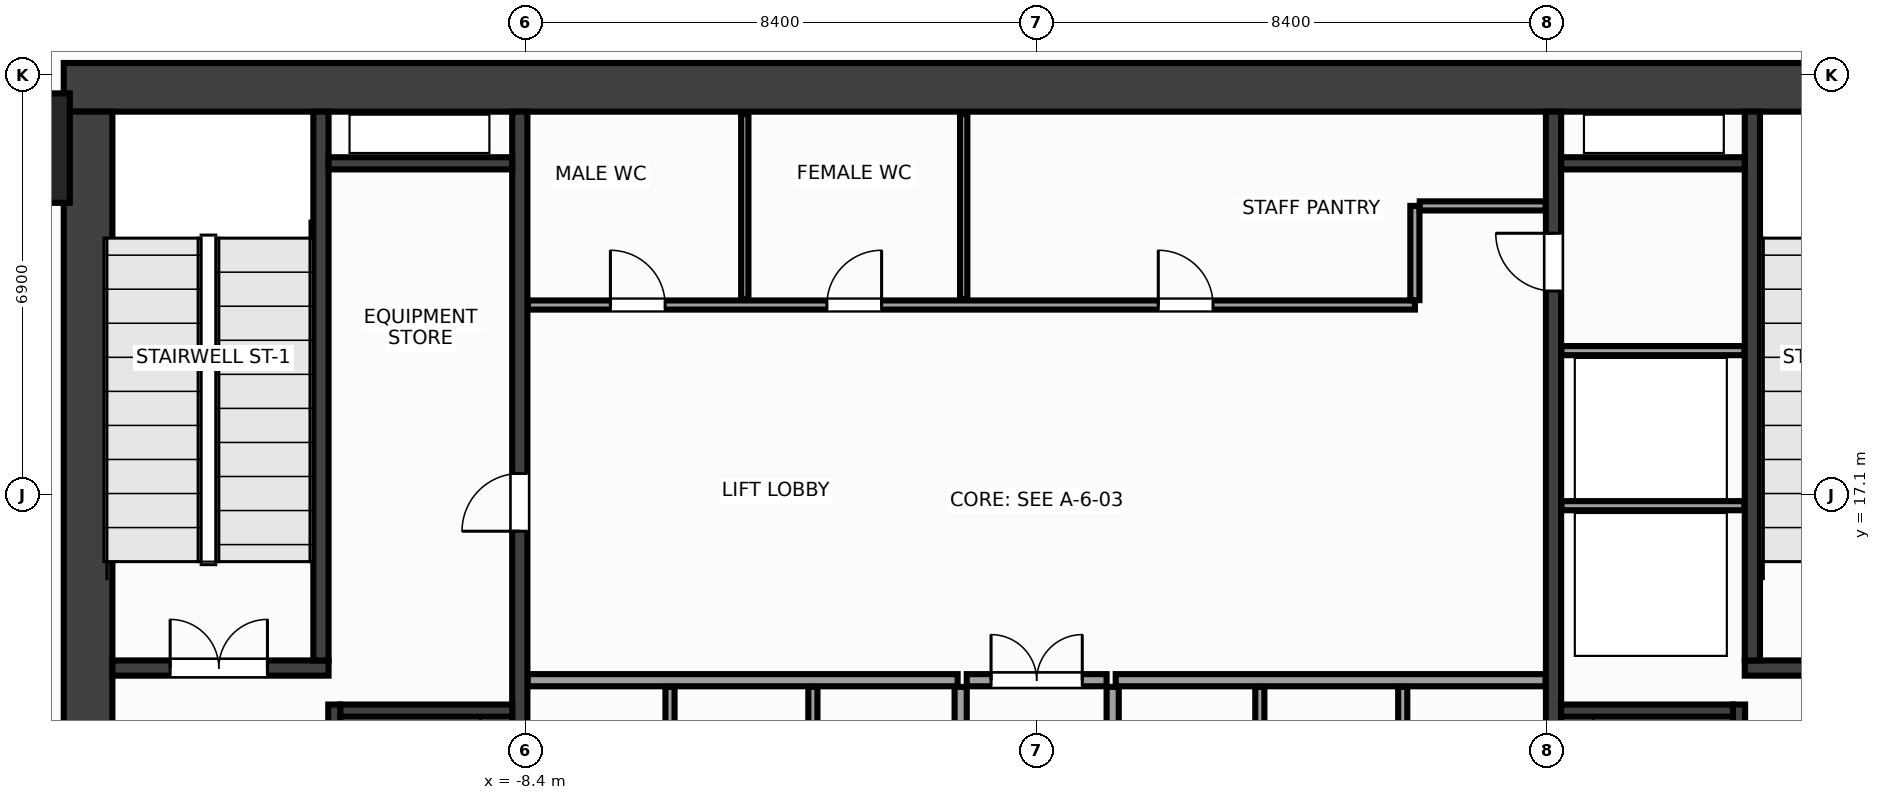
"""IFC4 building model, lengths in metres.
Left out: names, types, materials, properties, quantities, classifications, styles, units other than length and angle.
Written with IfcOpenShell. Run it as: python <this file> out.ifc"""

import sys

from ifc_helpers import new_model, si_unit, direction, frame, frame_2d, origin, origin_2d, place, context, subcontext, project, spatial, rectangle, extrude, source, transform, mapped, element, fill, save


model = new_model("IFC4")
c1 = context("Model", 3, precision=1e-05, world=origin(), true_north=direction((0.0, 1.0)))
c2 = subcontext(c1, "Body", "Model", "MODEL_VIEW")
j1 = project(units=[si_unit("LENGTHUNIT", "METRE"), si_unit("PLANEANGLEUNIT", "RADIAN")], contexts=[c1])
p1 = place(None, origin())
s1 = spatial("IfcSite", under=j1, at=p1, CompositionType="ELEMENT")
p2 = place(p1, origin())
s2 = spatial("IfcBuilding", under=s1, at=p2, CompositionType="ELEMENT")
p3 = place(p2, frame((0.0, 0.0, 70.4)))
s3 = spatial("IfcBuildingStorey", under=s2, at=p3, CompositionType="ELEMENT", Elevation=70.4)
m1 = source(origin(), c2, "Body", "SweptSolid", [
    extrude(rectangle(XDim=32.0, YDim=0.8, at=frame_2d((16.0, 0.0))), origin(), (0.0, 0.0, 1.0), 7.2),
])
p4 = place(p3, frame((-16.0, 23.8, 0.0), z_axis=(0.0, 0.0, 1.0), x_axis=(1.0, 0.0, 0.0)))
e1 = element("IfcWall", 1, at=p4, inside=s3, PredefinedType="SHEAR", context=c2, shape_type="MappedRepresentation", body=[
    mapped(m1, transform((0.0, 0.0, 0.0), x_axis=(1.0, 0.0, 0.0), y_axis=(0.0, 1.0, 0.0), z_axis=(0.0, 0.0, 1.0), scale=1.0)),
])
m2 = source(origin(), c2, "Body", "SweptSolid", [
    extrude(rectangle(XDim=12.8, YDim=0.8, at=frame_2d((6.4, 0.0))), origin(), (0.0, 0.0, 1.0), 7.2),
])
p5 = place(p3, frame((-15.6, 10.6, 0.0), z_axis=(0.0, 0.0, 1.0), x_axis=(0.0, 1.0, 0.0)))
e2 = element("IfcWall", 2, at=p5, inside=s3, PredefinedType="SHEAR", context=c2, shape_type="MappedRepresentation", body=[
    mapped(m2, transform((0.0, 0.0, 0.0), x_axis=(1.0, 0.0, 0.0), y_axis=(0.0, 1.0, 0.0), z_axis=(0.0, 0.0, 1.0), scale=1.0)),
])
m3 = source(origin(), c2, "Body", "SweptSolid", [
    extrude(rectangle(XDim=12.8, YDim=0.25, at=frame_2d((6.4, 0.0))), origin(), (0.0, 0.0, 1.0), 7.2),
])
p6 = place(p3, frame((-8.5, 10.6, 0.0), z_axis=(0.0, 0.0, 1.0), x_axis=(0.0, 1.0, 0.0)))
e3 = element("IfcWall", 3, at=p6, inside=s3, PredefinedType="SHEAR", context=c2, shape_type="MappedRepresentation", body=[
    mapped(m3, transform((0.0, 0.0, 0.0), x_axis=(1.0, 0.0, 0.0), y_axis=(0.0, 1.0, 0.0), z_axis=(0.0, 0.0, 1.0), scale=1.0)),
])
p7 = place(p6, frame((5.9, 0.0, 0.0)))
e4 = element("IfcOpeningElement", 4, at=p7, cuts=e3, PredefinedType="OPENING", context=c2, shape_type="SweptSolid", body=[
    extrude(rectangle(XDim=0.95, YDim=2.15, at=frame_2d((0.475, 1.075))), frame((0.0, 0.137, 0.0), z_axis=(0.0, -1.0, 0.0), x_axis=(1.0, 0.0, 0.0)), (0.0, 0.0, 1.0), 0.274),
])
p8 = place(p3, frame((8.5, 10.6, 0.0), z_axis=(0.0, 0.0, 1.0), x_axis=(0.0, 1.0, 0.0)))
e5 = element("IfcWall", 5, at=p8, inside=s3, PredefinedType="SHEAR", context=c2, shape_type="MappedRepresentation", body=[
    mapped(m3, transform((0.0, 0.0, 0.0), x_axis=(1.0, 0.0, 0.0), y_axis=(0.0, 1.0, 0.0), z_axis=(0.0, 0.0, 1.0), scale=1.0)),
])
p9 = place(p8, frame((9.85, 0.0, 0.0)))
e6 = element("IfcOpeningElement", 6, at=p9, cuts=e5, PredefinedType="OPENING", context=c2, shape_type="SweptSolid", body=[
    extrude(rectangle(XDim=0.95, YDim=2.15, at=frame_2d((0.475, 1.075))), frame((0.0, 0.137, 0.0), z_axis=(0.0, -1.0, 0.0), x_axis=(1.0, 0.0, 0.0)), (0.0, 0.0, 1.0), 0.274),
])
m4 = source(origin(), c2, "Body", "SweptSolid", [
    extrude(rectangle(XDim=3.555, YDim=0.25, at=frame_2d((1.777, 0.0))), origin(), (0.0, 0.0, 1.0), 7.2),
])
p10 = place(p3, frame((-15.2, 14.25, 0.0), z_axis=(0.0, 0.0, 1.0), x_axis=(1.0, 0.0, 0.0)))
e7 = element("IfcWall", 7, at=p10, inside=s3, PredefinedType="SHEAR", context=c2, shape_type="MappedRepresentation", body=[
    mapped(m4, transform((0.0, 0.0, 0.0), x_axis=(1.0, 0.0, 0.0), y_axis=(0.0, 1.0, 0.0), z_axis=(0.0, 0.0, 1.0), scale=1.0)),
])
p11 = place(p10, frame((0.95, 0.0, 0.0)))
e8 = element("IfcOpeningElement", 8, at=p11, cuts=e7, PredefinedType="OPENING", context=c2, shape_type="SweptSolid", body=[
    extrude(rectangle(XDim=1.6, YDim=2.15, at=frame_2d((0.8, 1.075))), frame((0.0, 0.137, 0.0), z_axis=(0.0, -1.0, 0.0), x_axis=(1.0, 0.0, 0.0)), (0.0, 0.0, 1.0), 0.274),
])
m5 = source(origin(), c2, "Body", "SweptSolid", [
    extrude(rectangle(XDim=9.025, YDim=0.25, at=frame_2d((4.512, 0.0))), origin(), (0.0, 0.0, 1.0), 7.2),
])
p12 = place(p3, frame((-11.77, 14.375, 0.0), z_axis=(0.0, 0.0, 1.0), x_axis=(0.0, 1.0, 0.0)))
e9 = element("IfcWall", 9, at=p12, inside=s3, PredefinedType="SHEAR", context=c2, shape_type="MappedRepresentation", body=[
    mapped(m5, transform((0.0, 0.0, 0.0), x_axis=(1.0, 0.0, 0.0), y_axis=(0.0, 1.0, 0.0), z_axis=(0.0, 0.0, 1.0), scale=1.0)),
])
p13 = place(p3, frame((11.645, 14.25, 0.0), z_axis=(0.0, 0.0, 1.0), x_axis=(1.0, 0.0, 0.0)))
e10 = element("IfcWall", 10, at=p13, inside=s3, PredefinedType="SHEAR", context=c2, shape_type="MappedRepresentation", body=[
    mapped(m4, transform((0.0, 0.0, 0.0), x_axis=(1.0, 0.0, 0.0), y_axis=(0.0, 1.0, 0.0), z_axis=(0.0, 0.0, 1.0), scale=1.0)),
])
p14 = place(p13, frame((0.95, 0.0, 0.0)))
e11 = element("IfcOpeningElement", 11, at=p14, cuts=e10, PredefinedType="OPENING", context=c2, shape_type="SweptSolid", body=[
    extrude(rectangle(XDim=1.6, YDim=2.15, at=frame_2d((0.8, 1.075))), frame((0.0, 0.137, 0.0), z_axis=(0.0, -1.0, 0.0), x_axis=(1.0, 0.0, 0.0)), (0.0, 0.0, 1.0), 0.274),
])
p15 = place(p3, frame((11.77, 14.375, 0.0), z_axis=(0.0, 0.0, 1.0), x_axis=(0.0, 1.0, 0.0)))
e12 = element("IfcWall", 12, at=p15, inside=s3, PredefinedType="SHEAR", context=c2, shape_type="MappedRepresentation", body=[
    mapped(m5, transform((0.0, 0.0, 0.0), x_axis=(1.0, 0.0, 0.0), y_axis=(0.0, 1.0, 0.0), z_axis=(0.0, 0.0, 1.0), scale=1.0)),
])
m6 = source(origin(), c2, "Body", "SweptSolid", [
    extrude(rectangle(XDim=3.05, YDim=0.2, at=frame_2d((1.525, 0.0))), origin(), (0.0, 0.0, 1.0), 7.2),
])
p16 = place(p3, frame((-11.55, 10.6, 0.0), z_axis=(0.0, 0.0, 1.0), x_axis=(0.0, 1.0, 0.0)))
e13 = element("IfcWall", 13, at=p16, inside=s3, PredefinedType="SHEAR", context=c2, shape_type="MappedRepresentation", body=[
    mapped(m6, transform((0.0, 0.0, 0.0), x_axis=(1.0, 0.0, 0.0), y_axis=(0.0, 1.0, 0.0), z_axis=(0.0, 0.0, 1.0), scale=1.0)),
])
p17 = place(p16, frame((0.9, 0.0, 0.0)))
e14 = element("IfcOpeningElement", 14, at=p17, cuts=e13, PredefinedType="OPENING", context=c2, shape_type="SweptSolid", body=[
    extrude(rectangle(XDim=1.1, YDim=2.15, at=frame_2d((0.55, 1.075))), frame((0.0, 0.112, 0.0), z_axis=(0.0, -1.0, 0.0), x_axis=(1.0, 0.0, 0.0)), (0.0, 0.0, 1.0), 0.224),
])
m7 = source(origin(), c2, "Body", "SweptSolid", [
    extrude(rectangle(XDim=2.825, YDim=0.2, at=frame_2d((1.413, 0.0))), origin(), (0.0, 0.0, 1.0), 7.2),
])
p18 = place(p3, frame((-11.45, 13.55, 0.0), z_axis=(0.0, 0.0, 1.0), x_axis=(1.0, 0.0, 0.0)))
e15 = element("IfcWall", 15, at=p18, inside=s3, PredefinedType="SHEAR", context=c2, shape_type="MappedRepresentation", body=[
    mapped(m7, transform((0.0, 0.0, 0.0), x_axis=(1.0, 0.0, 0.0), y_axis=(0.0, 1.0, 0.0), z_axis=(0.0, 0.0, 1.0), scale=1.0)),
])
p19 = place(p3, frame((11.55, 10.6, 0.0), z_axis=(0.0, 0.0, 1.0), x_axis=(0.0, 1.0, 0.0)))
e16 = element("IfcWall", 16, at=p19, inside=s3, PredefinedType="SHEAR", context=c2, shape_type="MappedRepresentation", body=[
    mapped(m6, transform((0.0, 0.0, 0.0), x_axis=(1.0, 0.0, 0.0), y_axis=(0.0, 1.0, 0.0), z_axis=(0.0, 0.0, 1.0), scale=1.0)),
])
p20 = place(p19, frame((0.9, 0.0, 0.0)))
e17 = element("IfcOpeningElement", 17, at=p20, cuts=e16, PredefinedType="OPENING", context=c2, shape_type="SweptSolid", body=[
    extrude(rectangle(XDim=1.1, YDim=2.15, at=frame_2d((0.55, 1.075))), frame((0.0, 0.112, 0.0), z_axis=(0.0, -1.0, 0.0), x_axis=(1.0, 0.0, 0.0)), (0.0, 0.0, 1.0), 0.224),
])
p21 = place(p3, frame((8.625, 13.55, 0.0), z_axis=(0.0, 0.0, 1.0), x_axis=(1.0, 0.0, 0.0)))
e18 = element("IfcWall", 18, at=p21, inside=s3, PredefinedType="SHEAR", context=c2, shape_type="MappedRepresentation", body=[
    mapped(m7, transform((0.0, 0.0, 0.0), x_axis=(1.0, 0.0, 0.0), y_axis=(0.0, 1.0, 0.0), z_axis=(0.0, 0.0, 1.0), scale=1.0)),
])
m8 = source(origin(), c2, "Body", "SweptSolid", [
    extrude(rectangle(XDim=3.02, YDim=0.2, at=frame_2d((1.51, 0.0))), origin(), (0.0, 0.0, 1.0), 7.2),
])
for number, where, z_axis, x_axis in (
    (19, (-11.645, 22.55, 0.0), (0.0, 0.0, 1.0), (1.0, 0.0, 0.0)),
    (20, (8.625, 22.55, 0.0), (0.0, 0.0, 1.0), (1.0, 0.0, 0.0)),
):
    element("IfcWall", number, at=place(p3, frame(where, z_axis=z_axis, x_axis=x_axis)), inside=s3, PredefinedType="SHEAR", context=c2, shape_type="MappedRepresentation", body=[
        mapped(m8, transform((0.0, 0.0, 0.0), x_axis=(1.0, 0.0, 0.0), y_axis=(0.0, 1.0, 0.0), z_axis=(0.0, 0.0, 1.0), scale=1.0)),
    ])
m9 = source(origin(), c2, "Body", "SweptSolid", [
    extrude(rectangle(XDim=1.8, YDim=1.8, at=origin_2d()), origin(), (0.0, 0.0, 1.0), 7.2),
])
p22 = place(p3, frame((-16.8, 22.8, 0.0), z_axis=(0.0, 0.0, 1.0), x_axis=(1.0, 0.0, 0.0)))
e21 = element("IfcColumn", 21, at=p22, inside=s3, PredefinedType="COLUMN", context=c2, shape_type="MappedRepresentation", body=[
    mapped(m9, transform((0.0, 0.0, 0.0), x_axis=(1.0, 0.0, 0.0), y_axis=(0.0, 1.0, 0.0), z_axis=(0.0, 0.0, 1.0), scale=1.0)),
])
m10 = source(origin(), c2, "Body", "SweptSolid", [
    extrude(rectangle(XDim=3.01, YDim=0.15, at=frame_2d((1.505, 0.0))), origin(), (0.0, 0.0, 1.0), 6.9),
])
for number, where, z_axis, x_axis in (
    (22, (8.63, 16.92, 0.0), (0.0, 0.0, 1.0), (1.0, 0.0, 0.0)),
    (23, (8.63, 19.47, 0.0), (0.0, 0.0, 1.0), (1.0, 0.0, 0.0)),
):
    element("IfcWall", number, at=place(p3, frame(where, z_axis=z_axis, x_axis=x_axis)), inside=s3, PredefinedType="PARTITIONING", context=c2, shape_type="MappedRepresentation", body=[
        mapped(m10, transform((0.0, 0.0, 0.0), x_axis=(1.0, 0.0, 0.0), y_axis=(0.0, 1.0, 0.0), z_axis=(0.0, 0.0, 1.0), scale=1.0)),
    ])
m11 = source(origin(), c2, "Body", "SweptSolid", [
    extrude(rectangle(XDim=7.07, YDim=0.2, at=frame_2d((3.535, 0.0))), origin(), (0.0, 0.0, 1.0), 6.9),
])
for number, where, z_axis, x_axis in (
    (24, (-8.37, 14.05, 0.0), (0.0, 0.0, 1.0), (1.0, 0.0, 0.0)),
    (25, (1.3, 14.05, 0.0), (0.0, 0.0, 1.0), (1.0, 0.0, 0.0)),
):
    element("IfcWall", number, at=place(p3, frame(where, z_axis=z_axis, x_axis=x_axis)), inside=s3, PredefinedType="PARTITIONING", context=c2, shape_type="MappedRepresentation", body=[
        mapped(m11, transform((0.0, 0.0, 0.0), x_axis=(1.0, 0.0, 0.0), y_axis=(0.0, 1.0, 0.0), z_axis=(0.0, 0.0, 1.0), scale=1.0)),
    ])
m12 = source(origin(), c2, "Body", "SweptSolid", [
    extrude(rectangle(XDim=3.34, YDim=0.2, at=frame_2d((1.67, 0.0))), origin(), (0.0, 0.0, 1.0), 6.9),
])
for number, where, z_axis, x_axis in (
    (26, (-1.25, 10.6, 0.0), (0.0, 0.0, 1.0), (0.0, 1.0, 0.0)),
    (27, (1.25, 10.6, 0.0), (0.0, 0.0, 1.0), (0.0, 1.0, 0.0)),
):
    element("IfcWall", number, at=place(p3, frame(where, z_axis=z_axis, x_axis=x_axis)), inside=s3, PredefinedType="PARTITIONING", context=c2, shape_type="MappedRepresentation", body=[
        mapped(m12, transform((0.0, 0.0, 0.0), x_axis=(1.0, 0.0, 0.0), y_axis=(0.0, 1.0, 0.0), z_axis=(0.0, 0.0, 1.0), scale=1.0)),
    ])
m13 = source(origin(), c2, "Body", "SweptSolid", [
    extrude(rectangle(XDim=2.3, YDim=0.2, at=frame_2d((1.15, 0.0))), origin(), (0.0, 0.0, 1.0), 6.9),
])
p23 = place(p3, frame((-1.15, 14.05, 0.0), z_axis=(0.0, 0.0, 1.0), x_axis=(1.0, 0.0, 0.0)))
e28 = element("IfcWall", 28, at=p23, inside=s3, PredefinedType="PARTITIONING", context=c2, shape_type="MappedRepresentation", body=[
    mapped(m13, transform((0.0, 0.0, 0.0), x_axis=(1.0, 0.0, 0.0), y_axis=(0.0, 1.0, 0.0), z_axis=(0.0, 0.0, 1.0), scale=1.0)),
])
p24 = place(p23, frame((0.4, 0.0, 0.0)))
e29 = element("IfcOpeningElement", 29, at=p24, cuts=e28, PredefinedType="OPENING", context=c2, shape_type="SweptSolid", body=[
    extrude(rectangle(XDim=1.5, YDim=2.2, at=frame_2d((0.75, 1.1))), frame((0.0, 0.112, 0.0), z_axis=(0.0, -1.0, 0.0), x_axis=(1.0, 0.0, 0.0)), (0.0, 0.0, 1.0), 0.224),
])
m14 = source(origin(), c2, "Body", "SweptSolid", [
    extrude(rectangle(XDim=14.59, YDim=0.15, at=frame_2d((7.295, 0.0))), origin(), (0.0, 0.0, 1.0), 6.9),
])
p25 = place(p3, frame((-8.37, 20.22, 0.0), z_axis=(0.0, 0.0, 1.0), x_axis=(1.0, 0.0, 0.0)))
e30 = element("IfcWall", 30, at=p25, inside=s3, PredefinedType="PARTITIONING", context=c2, shape_type="MappedRepresentation", body=[
    mapped(m14, transform((0.0, 0.0, 0.0), x_axis=(1.0, 0.0, 0.0), y_axis=(0.0, 1.0, 0.0), z_axis=(0.0, 0.0, 1.0), scale=1.0)),
])
p26 = place(p25, frame((1.36, 0.0, 0.0)))
e31 = element("IfcOpeningElement", 31, at=p26, cuts=e30, PredefinedType="OPENING", context=c2, shape_type="SweptSolid", body=[
    extrude(rectangle(XDim=0.9, YDim=2.15, at=frame_2d((0.45, 1.075))), frame((0.0, 0.087, 0.0), z_axis=(0.0, -1.0, 0.0), x_axis=(1.0, 0.0, 0.0)), (0.0, 0.0, 1.0), 0.174),
])
p27 = place(p25, frame((4.92, 0.0, 0.0)))
e32 = element("IfcOpeningElement", 32, at=p27, cuts=e30, PredefinedType="OPENING", context=c2, shape_type="SweptSolid", body=[
    extrude(rectangle(XDim=0.9, YDim=2.15, at=frame_2d((0.45, 1.075))), frame((0.0, 0.087, 0.0), z_axis=(0.0, -1.0, 0.0), x_axis=(1.0, 0.0, 0.0)), (0.0, 0.0, 1.0), 0.174),
])
p28 = place(p25, frame((10.37, 0.0, 0.0)))
e33 = element("IfcOpeningElement", 33, at=p28, cuts=e30, PredefinedType="OPENING", context=c2, shape_type="SweptSolid", body=[
    extrude(rectangle(XDim=0.9, YDim=2.15, at=frame_2d((0.45, 1.075))), frame((0.0, 0.087, 0.0), z_axis=(0.0, -1.0, 0.0), x_axis=(1.0, 0.0, 0.0)), (0.0, 0.0, 1.0), 0.174),
])
m15 = source(origin(), c2, "Body", "SweptSolid", [
    extrude(rectangle(XDim=1.55, YDim=0.15, at=frame_2d((0.775, 0.0))), origin(), (0.0, 0.0, 1.0), 6.9),
])
p29 = place(p3, frame((6.22, 20.3, 0.0), z_axis=(0.0, 0.0, 1.0), x_axis=(0.0, 1.0, 0.0)))
e34 = element("IfcWall", 34, at=p29, inside=s3, PredefinedType="PARTITIONING", context=c2, shape_type="MappedRepresentation", body=[
    mapped(m15, transform((0.0, 0.0, 0.0), x_axis=(1.0, 0.0, 0.0), y_axis=(0.0, 1.0, 0.0), z_axis=(0.0, 0.0, 1.0), scale=1.0)),
])
m16 = source(origin(), c2, "Body", "SweptSolid", [
    extrude(rectangle(XDim=2.07, YDim=0.15, at=frame_2d((1.035, 0.0))), origin(), (0.0, 0.0, 1.0), 6.9),
])
p30 = place(p3, frame((6.3, 21.85, 0.0), z_axis=(0.0, 0.0, 1.0), x_axis=(1.0, 0.0, 0.0)))
e35 = element("IfcWall", 35, at=p30, inside=s3, PredefinedType="PARTITIONING", context=c2, shape_type="MappedRepresentation", body=[
    mapped(m16, transform((0.0, 0.0, 0.0), x_axis=(1.0, 0.0, 0.0), y_axis=(0.0, 1.0, 0.0), z_axis=(0.0, 0.0, 1.0), scale=1.0)),
])
m17 = source(origin(), c2, "Body", "SweptSolid", [
    extrude(rectangle(XDim=3.34, YDim=0.15, at=frame_2d((1.67, 0.0))), origin(), (0.0, 0.0, 1.0), 6.9),
])
for number, where, z_axis, x_axis in (
    (36, (-6.03, 10.6, 0.0), (0.0, 0.0, 1.0), (0.0, 1.0, 0.0)),
    (37, (-3.68, 10.6, 0.0), (0.0, 0.0, 1.0), (0.0, 1.0, 0.0)),
    (38, (3.67, 10.6, 0.0), (0.0, 0.0, 1.0), (0.0, 1.0, 0.0)),
    (39, (6.02, 10.6, 0.0), (0.0, 0.0, 1.0), (0.0, 1.0, 0.0)),
):
    element("IfcWall", number, at=place(p3, frame(where, z_axis=z_axis, x_axis=x_axis)), inside=s3, PredefinedType="PARTITIONING", context=c2, shape_type="MappedRepresentation", body=[
        mapped(m17, transform((0.0, 0.0, 0.0), x_axis=(1.0, 0.0, 0.0), y_axis=(0.0, 1.0, 0.0), z_axis=(0.0, 0.0, 1.0), scale=1.0)),
    ])
m18 = source(origin(), c2, "Body", "SweptSolid", [
    extrude(rectangle(XDim=3.04, YDim=0.12, at=frame_2d((1.52, 0.0))), origin(), (0.0, 0.0, 1.0), 6.9),
])
for number, where, z_axis, x_axis in (
    (40, (-4.8, 20.32, 0.0), (0.0, 0.0, 1.0), (0.0, 1.0, 0.0)),
    (41, (-1.2, 20.32, 0.0), (0.0, 0.0, 1.0), (0.0, 1.0, 0.0)),
):
    element("IfcWall", number, at=place(p3, frame(where, z_axis=z_axis, x_axis=x_axis)), inside=s3, PredefinedType="PARTITIONING", context=c2, shape_type="MappedRepresentation", body=[
        mapped(m18, transform((0.0, 0.0, 0.0), x_axis=(1.0, 0.0, 0.0), y_axis=(0.0, 1.0, 0.0), z_axis=(0.0, 0.0, 1.0), scale=1.0)),
    ])
m19 = source(origin(), c2, "Body", "SweptSolid", [
    extrude(rectangle(XDim=1.6, YDim=2.15, at=frame_2d((0.8, 1.075))), frame((0.0, 0.025, 0.0), z_axis=(0.0, -1.0, 0.0), x_axis=(1.0, 0.0, 0.0)), (0.0, 0.0, 1.0), 0.05),
])
p31 = place(p11, origin())
e42 = element("IfcDoor", 42, at=p31, inside=s3, OperationType="DOUBLE_DOOR_SINGLE_SWING", PredefinedType="DOOR", context=c2, shape_type="MappedRepresentation", body=[
    mapped(m19, transform((0.0, 0.0, 0.0), x_axis=(1.0, 0.0, 0.0), y_axis=(0.0, 1.0, 0.0), z_axis=(0.0, 0.0, 1.0), scale=1.0)),
])
fill(e8, e42)
m20 = source(origin(), c2, "Body", "SweptSolid", [
    extrude(rectangle(XDim=0.95, YDim=2.15, at=frame_2d((0.475, 1.075))), frame((0.0, 0.025, 0.0), z_axis=(0.0, -1.0, 0.0), x_axis=(1.0, 0.0, 0.0)), (0.0, 0.0, 1.0), 0.05),
])
p32 = place(p7, origin())
e43 = element("IfcDoor", 43, at=p32, inside=s3, OperationType="SINGLE_SWING_LEFT", PredefinedType="DOOR", context=c2, shape_type="MappedRepresentation", body=[
    mapped(m20, transform((0.0, 0.0, 0.0), x_axis=(1.0, 0.0, 0.0), y_axis=(0.0, 1.0, 0.0), z_axis=(0.0, 0.0, 1.0), scale=1.0)),
])
fill(e4, e43)
m21 = source(origin(), c2, "Body", "SweptSolid", [
    extrude(rectangle(XDim=0.95, YDim=2.15, at=frame_2d((0.475, 1.075))), frame((0.0, 0.025, 0.0), z_axis=(0.0, -1.0, 0.0), x_axis=(1.0, 0.0, 0.0)), (0.0, 0.0, 1.0), 0.05),
])
p33 = place(p9, origin())
e44 = element("IfcDoor", 44, at=p33, inside=s3, OperationType="SINGLE_SWING_RIGHT", PredefinedType="DOOR", context=c2, shape_type="MappedRepresentation", body=[
    mapped(m21, transform((0.0, 0.0, 0.0), x_axis=(1.0, 0.0, 0.0), y_axis=(0.0, 1.0, 0.0), z_axis=(0.0, 0.0, 1.0), scale=1.0)),
])
fill(e6, e44)
m22 = source(origin(), c2, "Body", "SweptSolid", [
    extrude(rectangle(XDim=1.5, YDim=2.2, at=frame_2d((0.75, 1.1))), frame((0.0, 0.025, 0.0), z_axis=(0.0, -1.0, 0.0), x_axis=(1.0, 0.0, 0.0)), (0.0, 0.0, 1.0), 0.05),
])
p34 = place(p24, origin())
e45 = element("IfcDoor", 45, at=p34, inside=s3, OperationType="DOUBLE_DOOR_SINGLE_SWING", PredefinedType="DOOR", context=c2, shape_type="MappedRepresentation", body=[
    mapped(m22, transform((0.0, 0.0, 0.0), x_axis=(1.0, 0.0, 0.0), y_axis=(0.0, 1.0, 0.0), z_axis=(0.0, 0.0, 1.0), scale=1.0)),
])
fill(e29, e45)
m23 = source(origin(), c2, "Body", "SweptSolid", [
    extrude(rectangle(XDim=0.9, YDim=2.15, at=frame_2d((0.45, 1.075))), frame((0.0, 0.025, 0.0), z_axis=(0.0, -1.0, 0.0), x_axis=(1.0, 0.0, 0.0)), (0.0, 0.0, 1.0), 0.05),
])
p35 = place(p26, origin())
e46 = element("IfcDoor", 46, at=p35, inside=s3, OperationType="SINGLE_SWING_LEFT", PredefinedType="DOOR", context=c2, shape_type="MappedRepresentation", body=[
    mapped(m23, transform((0.0, 0.0, 0.0), x_axis=(1.0, 0.0, 0.0), y_axis=(0.0, 1.0, 0.0), z_axis=(0.0, 0.0, 1.0), scale=1.0)),
])
fill(e31, e46)
p36 = place(p27, origin())
e47 = element("IfcDoor", 47, at=p36, inside=s3, OperationType="SINGLE_SWING_RIGHT", PredefinedType="DOOR", context=c2, shape_type="MappedRepresentation", body=[
    mapped(m23, transform((0.0, 0.0, 0.0), x_axis=(1.0, 0.0, 0.0), y_axis=(0.0, 1.0, 0.0), z_axis=(0.0, 0.0, 1.0), scale=1.0)),
])
fill(e32, e47)
p37 = place(p28, origin())
e48 = element("IfcDoor", 48, at=p37, inside=s3, OperationType="SINGLE_SWING_LEFT", PredefinedType="DOOR", context=c2, shape_type="MappedRepresentation", body=[
    mapped(m23, transform((0.0, 0.0, 0.0), x_axis=(1.0, 0.0, 0.0), y_axis=(0.0, 1.0, 0.0), z_axis=(0.0, 0.0, 1.0), scale=1.0)),
])
fill(e33, e48)
save(model, sys.argv[1])
